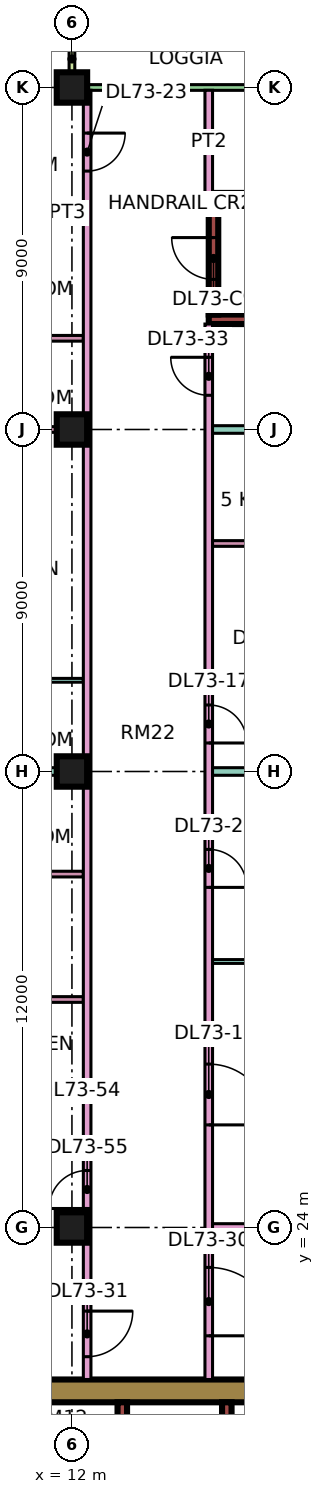
"""IFC4 building model, lengths in metres.
Left out: names, types, materials, properties, quantities, classifications, styles, units other than length and angle.
Written with IfcOpenShell. Run it as: python <this file> out.ifc"""

import sys

from ifc_helpers import new_model, si_unit, direction, frame, frame_2d, origin, origin_2d, place, context, subcontext, project, spatial, rectangle, extrude, element, fill, save


model = new_model("IFC4")
c1 = context("Model", 3, precision=1e-05, world=origin(), true_north=direction((0.0, 1.0)))
c2 = subcontext(c1, "Body", "Model", "MODEL_VIEW")
j1 = project(units=[si_unit("LENGTHUNIT", "METRE"), si_unit("PLANEANGLEUNIT", "RADIAN")], contexts=[c1])
p1 = place(None, origin())
s1 = spatial("IfcSite", under=j1, at=p1, CompositionType="ELEMENT")
p2 = place(p1, origin())
s2 = spatial("IfcBuilding", under=s1, at=p2, CompositionType="ELEMENT")
p3 = place(p2, frame((0.0, 0.0, 310.9)))
s3 = spatial("IfcBuildingStorey", under=s2, at=p3, CompositionType="ELEMENT", Elevation=310.9)
for number, where, z_axis, x_axis in (
    (1, (12.0, 24.0, 0.0), (0.0, 0.0, 1.0), (1.0, 0.0, 0.0)),
    (2, (12.0, 36.0, 0.0), (0.0, 0.0, 1.0), (1.0, 0.0, 0.0)),
    (3, (12.0, 45.0, 0.0), (0.0, 0.0, 1.0), (1.0, 0.0, 0.0)),
    (4, (12.0, 54.0, 0.0), (0.0, 0.0, 1.0), (1.0, 0.0, 0.0)),
):
    element("IfcColumn", number, at=place(p3, frame(where, z_axis=z_axis, x_axis=x_axis)), inside=s3, PredefinedType="COLUMN", context=c2, shape_type="SweptSolid", body=[
        extrude(rectangle(XDim=0.8, YDim=0.8, at=origin_2d()), origin(), (0.0, 0.0, 1.0), 3.75),
    ])
p4 = place(p3, frame((9.0, 19.7, 0.0), z_axis=(0.0, 0.0, 1.0), x_axis=(1.0, 0.0, 0.0)))
e5 = element("IfcWall", 5, at=p4, inside=s3, PredefinedType="SHEAR", context=c2, shape_type="SweptSolid", body=[
    extrude(rectangle(XDim=25.0, YDim=0.6, at=frame_2d((12.5, 0.0))), origin(), (0.0, 0.0, 1.0), 3.75),
])
p5 = place(p4, frame((19.1, 0.0, 0.0)))
e6 = element("IfcOpeningElement", 6, at=p5, cuts=e5, PredefinedType="OPENING", context=c2, shape_type="SweptSolid", body=[
    extrude(rectangle(XDim=1.8, YDim=2.4, at=frame_2d((0.9, 1.2))), frame((0.0, 0.31, 0.0), z_axis=(0.0, -1.0, 0.0), x_axis=(1.0, 0.0, 0.0)), (0.0, 0.0, 1.0), 0.62),
])
p6 = place(p3, frame((13.325, 7.6, 0.0), z_axis=(0.0, 0.0, 1.0), x_axis=(0.0, 1.0, 0.0)))
e7 = element("IfcWall", 7, at=p6, inside=s3, PredefinedType="SHEAR", context=c2, shape_type="SweptSolid", body=[
    extrude(rectangle(XDim=11.8, YDim=0.25, at=frame_2d((5.9, 0.0))), origin(), (0.0, 0.0, 1.0), 3.75),
])
p7 = place(p3, frame((16.075, 15.8, 0.0), z_axis=(0.0, 0.0, 1.0), x_axis=(0.0, 1.0, 0.0)))
e8 = element("IfcWall", 8, at=p7, inside=s3, PredefinedType="SHEAR", context=c2, shape_type="SweptSolid", body=[
    extrude(rectangle(XDim=3.6, YDim=0.25, at=frame_2d((1.8, 0.0))), origin(), (0.0, 0.0, 1.0), 3.75),
])
for number, where, z_axis, x_axis in (
    (9, (15.6, 47.9, 0.0), (0.0, 0.0, 1.0), (1.0, 0.0, 0.0)),
    (10, (15.6, 51.1, 0.0), (0.0, 0.0, 1.0), (1.0, 0.0, 0.0)),
):
    element("IfcWall", number, at=place(p3, frame(where, z_axis=z_axis, x_axis=x_axis)), inside=s3, PredefinedType="SHEAR", context=c2, shape_type="SweptSolid", body=[
        extrude(rectangle(XDim=7.0, YDim=0.25, at=frame_2d((3.5, 0.0))), origin(), (0.0, 0.0, 1.0), 3.75),
    ])
p8 = place(p3, frame((15.725, 48.025, 0.0), z_axis=(0.0, 0.0, 1.0), x_axis=(0.0, 1.0, 0.0)))
e11 = element("IfcWall", 11, at=p8, inside=s3, PredefinedType="SHEAR", context=c2, shape_type="SweptSolid", body=[
    extrude(rectangle(XDim=2.95, YDim=0.25, at=frame_2d((1.475, 0.0))), origin(), (0.0, 0.0, 1.0), 3.75),
])
p9 = place(p8, frame((0.925, 0.0, 0.0)))
e12 = element("IfcOpeningElement", 12, at=p9, cuts=e11, PredefinedType="OPENING", context=c2, shape_type="SweptSolid", body=[
    extrude(rectangle(XDim=1.1, YDim=2.2, at=frame_2d((0.55, 1.1))), frame((0.0, 0.135, 0.0), z_axis=(0.0, -1.0, 0.0), x_axis=(1.0, 0.0, 0.0)), (0.0, 0.0, 1.0), 0.27),
])
p10 = place(p3, frame((22.425, 54.0, 0.0), z_axis=(0.0, 0.0, 1.0), x_axis=(-1.0, 0.0, 0.0)))
e13 = element("IfcWall", 13, at=p10, inside=s3, PredefinedType="SOLIDWALL", context=c2, shape_type="SweptSolid", body=[
    extrude(rectangle(XDim=10.35, YDim=0.15, at=frame_2d((5.175, 0.0))), origin(), (0.0, 0.0, 1.0), 3.35),
])
p11 = place(p10, frame((1.012, 0.0, 0.45)))
e14 = element("IfcOpeningElement", 14, at=p11, cuts=e13, PredefinedType="OPENING", context=c2, shape_type="SweptSolid", body=[
    extrude(rectangle(XDim=4.8, YDim=2.4, at=frame_2d((2.4, 1.2))), frame((0.0, 0.085, 0.0), z_axis=(0.0, -1.0, 0.0), x_axis=(1.0, 0.0, 0.0)), (0.0, 0.0, 1.0), 0.17),
])
p12 = place(p3, frame((12.0, 55.5, 0.0), z_axis=(0.0, 0.0, 1.0), x_axis=(0.0, -1.0, 0.0)))
e15 = element("IfcWall", 15, at=p12, inside=s3, PredefinedType="SOLIDWALL", context=c2, shape_type="SweptSolid", body=[
    extrude(rectangle(XDim=1.5, YDim=0.15, at=frame_2d((0.75, 0.0))), origin(), (0.0, 0.0, 1.0), 3.35),
])
p13 = place(p3, frame((0.0, 36.0, 0.0), z_axis=(0.0, 0.0, 1.0), x_axis=(1.0, 0.0, 0.0)))
e16 = element("IfcWall", 16, at=p13, inside=s3, PredefinedType="PARTITIONING", context=c2, shape_type="SweptSolid", body=[
    extrude(rectangle(XDim=12.3, YDim=0.2, at=frame_2d((6.15, 0.0))), origin(), (0.0, 0.0, 1.0), 3.35),
])
p14 = place(p3, frame((0.074, 22.4, 0.0), z_axis=(0.0, 0.0, 1.0), x_axis=(1.0, 0.0, 0.0)))
e17 = element("IfcWall", 17, at=p14, inside=s3, PredefinedType="PARTITIONING", context=c2, shape_type="SweptSolid", body=[
    extrude(rectangle(XDim=12.226, YDim=0.2, at=frame_2d((6.113, 0.0))), origin(), (0.0, 0.0, 1.0), 3.35),
])
p15 = place(p3, frame((7.675, 27.6, 0.0), z_axis=(0.0, 0.0, 1.0), x_axis=(1.0, 0.0, 0.0)))
e18 = element("IfcWall", 18, at=p15, inside=s3, PredefinedType="PARTITIONING", context=c2, shape_type="SweptSolid", body=[
    extrude(rectangle(XDim=4.625, YDim=0.1, at=frame_2d((2.312, 0.0))), origin(), (0.0, 0.0, 1.0), 3.35),
])
p16 = place(p15, frame((1.875, 0.0, 0.0)))
e19 = element("IfcOpeningElement", 19, at=p16, cuts=e18, PredefinedType="OPENING", context=c2, shape_type="SweptSolid", body=[
    extrude(rectangle(XDim=0.9, YDim=2.1, at=frame_2d((0.45, 1.05))), frame((0.0, 0.06, 0.0), z_axis=(0.0, -1.0, 0.0), x_axis=(1.0, 0.0, 0.0)), (0.0, 0.0, 1.0), 0.12),
])
for number, where, z_axis, x_axis in (
    (20, (7.675, 30.0, 0.0), (0.0, 0.0, 1.0), (1.0, 0.0, 0.0)),
    (21, (7.675, 33.3, 0.0), (0.0, 0.0, 1.0), (1.0, 0.0, 0.0)),
):
    element("IfcWall", number, at=place(p3, frame(where, z_axis=z_axis, x_axis=x_axis)), inside=s3, PredefinedType="PARTITIONING", context=c2, shape_type="SweptSolid", body=[
        extrude(rectangle(XDim=4.625, YDim=0.15, at=frame_2d((2.312, 0.0))), origin(), (0.0, 0.0, 1.0), 3.35),
    ])
p17 = place(p3, frame((8.275, 38.4, 0.0), z_axis=(0.0, 0.0, 1.0), x_axis=(1.0, 0.0, 0.0)))
e22 = element("IfcWall", 22, at=p17, inside=s3, PredefinedType="PARTITIONING", context=c2, shape_type="SweptSolid", body=[
    extrude(rectangle(XDim=4.025, YDim=0.1, at=frame_2d((2.013, 0.0))), origin(), (0.0, 0.0, 1.0), 3.35),
])
for number, where, z_axis, x_axis in (
    (23, (8.275, 45.0, 0.0), (0.0, 0.0, 1.0), (1.0, 0.0, 0.0)),
    (24, (8.275, 47.4, 0.0), (0.0, 0.0, 1.0), (1.0, 0.0, 0.0)),
):
    element("IfcWall", number, at=place(p3, frame(where, z_axis=z_axis, x_axis=x_axis)), inside=s3, PredefinedType="PARTITIONING", context=c2, shape_type="SweptSolid", body=[
        extrude(rectangle(XDim=4.025, YDim=0.15, at=frame_2d((2.013, 0.0))), origin(), (0.0, 0.0, 1.0), 3.35),
    ])
p18 = place(p3, frame((8.275, 50.7, 0.0), z_axis=(0.0, 0.0, 1.0), x_axis=(1.0, 0.0, 0.0)))
e25 = element("IfcWall", 25, at=p18, inside=s3, PredefinedType="PARTITIONING", context=c2, shape_type="SweptSolid", body=[
    extrude(rectangle(XDim=4.025, YDim=0.1, at=frame_2d((2.013, 0.0))), origin(), (0.0, 0.0, 1.0), 3.35),
])
p19 = place(p18, frame((1.575, 0.0, 0.0)))
e26 = element("IfcOpeningElement", 26, at=p19, cuts=e25, PredefinedType="OPENING", context=c2, shape_type="SweptSolid", body=[
    extrude(rectangle(XDim=0.9, YDim=2.1, at=frame_2d((0.45, 1.05))), frame((0.0, 0.06, 0.0), z_axis=(0.0, -1.0, 0.0), x_axis=(1.0, 0.0, 0.0)), (0.0, 0.0, 1.0), 0.12),
])
p20 = place(p3, frame((12.4, 20.0, 0.0), z_axis=(0.0, 0.0, 1.0), x_axis=(0.0, 1.0, 0.0)))
e27 = element("IfcWall", 27, at=p20, inside=s3, PredefinedType="PARTITIONING", context=c2, shape_type="SweptSolid", body=[
    extrude(rectangle(XDim=33.926, YDim=0.2, at=frame_2d((16.963, 0.0))), origin(), (0.0, 0.0, 1.0), 3.35),
])
p21 = place(p20, frame((31.8, 0.0, 0.0)))
e28 = element("IfcOpeningElement", 28, at=p21, cuts=e27, PredefinedType="OPENING", context=c2, shape_type="SweptSolid", body=[
    extrude(rectangle(XDim=1.0, YDim=2.1, at=frame_2d((0.5, 1.05))), frame((0.0, 0.11, 0.0), z_axis=(0.0, -1.0, 0.0), x_axis=(1.0, 0.0, 0.0)), (0.0, 0.0, 1.0), 0.22),
])
p22 = place(p20, frame((0.6, 0.0, 0.0)))
e29 = element("IfcOpeningElement", 29, at=p22, cuts=e27, PredefinedType="OPENING", context=c2, shape_type="SweptSolid", body=[
    extrude(rectangle(XDim=1.2, YDim=2.1, at=frame_2d((0.6, 1.05))), frame((0.0, 0.11, 0.0), z_axis=(0.0, -1.0, 0.0), x_axis=(1.0, 0.0, 0.0)), (0.0, 0.0, 1.0), 0.22),
])
p23 = place(p20, frame((4.5, 0.0, 0.0)))
e30 = element("IfcOpeningElement", 30, at=p23, cuts=e27, PredefinedType="OPENING", context=c2, shape_type="SweptSolid", body=[
    extrude(rectangle(XDim=1.0, YDim=2.1, at=frame_2d((0.5, 1.05))), frame((0.0, 0.11, 0.0), z_axis=(0.0, -1.0, 0.0), x_axis=(1.0, 0.0, 0.0)), (0.0, 0.0, 1.0), 0.22),
])
p24 = place(p3, frame((15.6, 20.0, 0.0), z_axis=(0.0, 0.0, 1.0), x_axis=(0.0, 1.0, 0.0)))
e31 = element("IfcWall", 31, at=p24, inside=s3, PredefinedType="PARTITIONING", context=c2, shape_type="SweptSolid", body=[
    extrude(rectangle(XDim=27.775, YDim=0.2, at=frame_2d((13.887, 0.0))), origin(), (0.0, 0.0, 1.0), 3.35),
])
p25 = place(p24, frame((6.7, 0.0, 0.0)))
e32 = element("IfcOpeningElement", 32, at=p25, cuts=e31, PredefinedType="OPENING", context=c2, shape_type="SweptSolid", body=[
    extrude(rectangle(XDim=1.6, YDim=2.1, at=frame_2d((0.8, 1.05))), frame((0.0, 0.11, 0.0), z_axis=(0.0, -1.0, 0.0), x_axis=(1.0, 0.0, 0.0)), (0.0, 0.0, 1.0), 0.22),
])
p26 = place(p24, frame((12.95, 0.0, 0.0)))
e33 = element("IfcOpeningElement", 33, at=p26, cuts=e31, PredefinedType="OPENING", context=c2, shape_type="SweptSolid", body=[
    extrude(rectangle(XDim=1.0, YDim=2.1, at=frame_2d((0.5, 1.05))), frame((0.0, 0.11, 0.0), z_axis=(0.0, -1.0, 0.0), x_axis=(1.0, 0.0, 0.0)), (0.0, 0.0, 1.0), 0.22),
])
p27 = place(p24, frame((16.75, 0.0, 0.0)))
e34 = element("IfcOpeningElement", 34, at=p27, cuts=e31, PredefinedType="OPENING", context=c2, shape_type="SweptSolid", body=[
    extrude(rectangle(XDim=1.0, YDim=2.1, at=frame_2d((0.5, 1.05))), frame((0.0, 0.11, 0.0), z_axis=(0.0, -1.0, 0.0), x_axis=(1.0, 0.0, 0.0)), (0.0, 0.0, 1.0), 0.22),
])
p28 = place(p24, frame((1.15, 0.0, 0.0)))
e35 = element("IfcOpeningElement", 35, at=p28, cuts=e31, PredefinedType="OPENING", context=c2, shape_type="SweptSolid", body=[
    extrude(rectangle(XDim=1.8, YDim=2.1, at=frame_2d((0.9, 1.05))), frame((0.0, 0.11, 0.0), z_axis=(0.0, -1.0, 0.0), x_axis=(1.0, 0.0, 0.0)), (0.0, 0.0, 1.0), 0.22),
])
p29 = place(p24, frame((25.9, 0.0, 0.0)))
e36 = element("IfcOpeningElement", 36, at=p29, cuts=e31, PredefinedType="OPENING", context=c2, shape_type="SweptSolid", body=[
    extrude(rectangle(XDim=1.0, YDim=2.1, at=frame_2d((0.5, 1.05))), frame((0.0, 0.11, 0.0), z_axis=(0.0, -1.0, 0.0), x_axis=(1.0, 0.0, 0.0)), (0.0, 0.0, 1.0), 0.22),
])
p30 = place(p3, frame((15.6, 51.225, 0.0), z_axis=(0.0, 0.0, 1.0), x_axis=(0.0, 1.0, 0.0)))
e37 = element("IfcWall", 37, at=p30, inside=s3, PredefinedType="PARTITIONING", context=c2, shape_type="SweptSolid", body=[
    extrude(rectangle(XDim=2.701, YDim=0.2, at=frame_2d((1.351, 0.0))), origin(), (0.0, 0.0, 1.0), 3.35),
])
p31 = place(p3, frame((15.7, 24.0, 0.0), z_axis=(0.0, 0.0, 1.0), x_axis=(1.0, 0.0, 0.0)))
e38 = element("IfcWall", 38, at=p31, inside=s3, PredefinedType="PARTITIONING", context=c2, shape_type="SweptSolid", body=[
    extrude(rectangle(XDim=5.8, YDim=0.2, at=frame_2d((2.9, 0.0))), origin(), (0.0, 0.0, 1.0), 3.35),
])
p32 = place(p3, frame((15.7, 31.0, 0.0), z_axis=(0.0, 0.0, 1.0), x_axis=(1.0, 0.0, 0.0)))
e39 = element("IfcWall", 39, at=p32, inside=s3, PredefinedType="PARTITIONING", context=c2, shape_type="SweptSolid", body=[
    extrude(rectangle(XDim=5.8, YDim=0.1, at=frame_2d((2.9, 0.0))), origin(), (0.0, 0.0, 1.0), 3.35),
])
p33 = place(p3, frame((15.7, 36.0, 0.0), z_axis=(0.0, 0.0, 1.0), x_axis=(1.0, 0.0, 0.0)))
e40 = element("IfcWall", 40, at=p33, inside=s3, PredefinedType="PARTITIONING", context=c2, shape_type="SweptSolid", body=[
    extrude(rectangle(XDim=8.3, YDim=0.2, at=frame_2d((4.15, 0.0))), origin(), (0.0, 0.0, 1.0), 3.35),
])
p34 = place(p3, frame((15.7, 38.4, 0.0), z_axis=(0.0, 0.0, 1.0), x_axis=(1.0, 0.0, 0.0)))
e41 = element("IfcWall", 41, at=p34, inside=s3, PredefinedType="PARTITIONING", context=c2, shape_type="SweptSolid", body=[
    extrude(rectangle(XDim=3.125, YDim=0.15, at=frame_2d((1.562, 0.0))), origin(), (0.0, 0.0, 1.0), 3.35),
])
p35 = place(p34, frame((1.2, 0.0, 0.0)))
e42 = element("IfcOpeningElement", 42, at=p35, cuts=e41, PredefinedType="OPENING", context=c2, shape_type="SweptSolid", body=[
    extrude(rectangle(XDim=0.8, YDim=2.1, at=frame_2d((0.4, 1.05))), frame((0.0, 0.085, 0.0), z_axis=(0.0, -1.0, 0.0), x_axis=(1.0, 0.0, 0.0)), (0.0, 0.0, 1.0), 0.17),
])
p36 = place(p3, frame((15.7, 42.0, 0.0), z_axis=(0.0, 0.0, 1.0), x_axis=(1.0, 0.0, 0.0)))
e43 = element("IfcWall", 43, at=p36, inside=s3, PredefinedType="PARTITIONING", context=c2, shape_type="SweptSolid", body=[
    extrude(rectangle(XDim=3.125, YDim=0.15, at=frame_2d((1.562, 0.0))), origin(), (0.0, 0.0, 1.0), 3.35),
])
p37 = place(p3, frame((15.7, 45.0, 0.0), z_axis=(0.0, 0.0, 1.0), x_axis=(1.0, 0.0, 0.0)))
e44 = element("IfcWall", 44, at=p37, inside=s3, PredefinedType="PARTITIONING", context=c2, shape_type="SweptSolid", body=[
    extrude(rectangle(XDim=8.226, YDim=0.2, at=frame_2d((4.113, 0.0))), origin(), (0.0, 0.0, 1.0), 3.35),
])
p38 = place(p9, frame((1.1, 0.0, 0.0), z_axis=(0.0, 0.0, 1.0), x_axis=(-1.0, 0.0, 0.0)))
e45 = element("IfcDoor", 45, at=p38, inside=s3, OperationType="SINGLE_SWING_RIGHT", PredefinedType="DOOR", context=c2, shape_type="SweptSolid", body=[
    extrude(rectangle(XDim=1.1, YDim=2.2, at=frame_2d((0.55, 1.1))), frame((0.0, 0.025, 0.0), z_axis=(0.0, -1.0, 0.0), x_axis=(1.0, 0.0, 0.0)), (0.0, 0.0, 1.0), 0.05),
])
fill(e12, e45)
p39 = place(p25, frame((1.6, 0.0, 0.0), z_axis=(0.0, 0.0, 1.0), x_axis=(-1.0, 0.0, 0.0)))
e46 = element("IfcDoor", 46, at=p39, inside=s3, OperationType="DOUBLE_DOOR_SINGLE_SWING", PredefinedType="DOOR", context=c2, shape_type="SweptSolid", body=[
    extrude(rectangle(XDim=1.6, YDim=2.1, at=frame_2d((0.8, 1.05))), frame((0.0, 0.025, 0.0), z_axis=(0.0, -1.0, 0.0), x_axis=(1.0, 0.0, 0.0)), (0.0, 0.0, 1.0), 0.05),
])
fill(e32, e46)
p40 = place(p26, frame((1.0, 0.0, 0.0), z_axis=(0.0, 0.0, 1.0), x_axis=(-1.0, 0.0, 0.0)))
e47 = element("IfcDoor", 47, at=p40, inside=s3, OperationType="SINGLE_SWING_LEFT", PredefinedType="DOOR", context=c2, shape_type="SweptSolid", body=[
    extrude(rectangle(XDim=1.0, YDim=2.1, at=frame_2d((0.5, 1.05))), frame((0.0, 0.025, 0.0), z_axis=(0.0, -1.0, 0.0), x_axis=(1.0, 0.0, 0.0)), (0.0, 0.0, 1.0), 0.05),
])
fill(e33, e47)
p41 = place(p27, frame((1.0, 0.0, 0.0), z_axis=(0.0, 0.0, 1.0), x_axis=(-1.0, 0.0, 0.0)))
e48 = element("IfcDoor", 48, at=p41, inside=s3, OperationType="SINGLE_SWING_LEFT", PredefinedType="DOOR", context=c2, shape_type="SweptSolid", body=[
    extrude(rectangle(XDim=1.0, YDim=2.1, at=frame_2d((0.5, 1.05))), frame((0.0, 0.025, 0.0), z_axis=(0.0, -1.0, 0.0), x_axis=(1.0, 0.0, 0.0)), (0.0, 0.0, 1.0), 0.05),
])
fill(e34, e48)
p42 = place(p21, origin())
e49 = element("IfcDoor", 49, at=p42, inside=s3, OperationType="SINGLE_SWING_RIGHT", PredefinedType="DOOR", context=c2, shape_type="SweptSolid", body=[
    extrude(rectangle(XDim=1.0, YDim=2.1, at=frame_2d((0.5, 1.05))), frame((0.0, 0.025, 0.0), z_axis=(0.0, -1.0, 0.0), x_axis=(1.0, 0.0, 0.0)), (0.0, 0.0, 1.0), 0.05),
])
fill(e28, e49)
p43 = place(p28, frame((1.8, 0.0, 0.0), z_axis=(0.0, 0.0, 1.0), x_axis=(-1.0, 0.0, 0.0)))
e50 = element("IfcDoor", 50, at=p43, inside=s3, OperationType="DOUBLE_DOOR_SINGLE_SWING", PredefinedType="DOOR", context=c2, shape_type="SweptSolid", body=[
    extrude(rectangle(XDim=1.8, YDim=2.1, at=frame_2d((0.9, 1.05))), frame((0.0, 0.025, 0.0), z_axis=(0.0, -1.0, 0.0), x_axis=(1.0, 0.0, 0.0)), (0.0, 0.0, 1.0), 0.05),
])
fill(e35, e50)
p44 = place(p22, origin())
e51 = element("IfcDoor", 51, at=p44, inside=s3, OperationType="SINGLE_SWING_RIGHT", PredefinedType="DOOR", context=c2, shape_type="SweptSolid", body=[
    extrude(rectangle(XDim=1.2, YDim=2.1, at=frame_2d((0.6, 1.05))), frame((0.0, 0.025, 0.0), z_axis=(0.0, -1.0, 0.0), x_axis=(1.0, 0.0, 0.0)), (0.0, 0.0, 1.0), 0.05),
])
fill(e29, e51)
p45 = place(p29, frame((1.0, 0.0, 0.0), z_axis=(0.0, 0.0, 1.0), x_axis=(-1.0, 0.0, 0.0)))
e52 = element("IfcDoor", 52, at=p45, inside=s3, OperationType="SINGLE_SWING_RIGHT", PredefinedType="DOOR", context=c2, shape_type="SweptSolid", body=[
    extrude(rectangle(XDim=1.0, YDim=2.1, at=frame_2d((0.5, 1.05))), frame((0.0, 0.025, 0.0), z_axis=(0.0, -1.0, 0.0), x_axis=(1.0, 0.0, 0.0)), (0.0, 0.0, 1.0), 0.05),
])
fill(e36, e52)
p46 = place(p23, origin())
e53 = element("IfcDoor", 53, at=p46, inside=s3, OperationType="SINGLE_SWING_LEFT", PredefinedType="DOOR", context=c2, shape_type="SweptSolid", body=[
    extrude(rectangle(XDim=1.0, YDim=2.1, at=frame_2d((0.5, 1.05))), frame((0.0, 0.025, 0.0), z_axis=(0.0, -1.0, 0.0), x_axis=(1.0, 0.0, 0.0)), (0.0, 0.0, 1.0), 0.05),
])
fill(e30, e53)
save(model, sys.argv[1])
